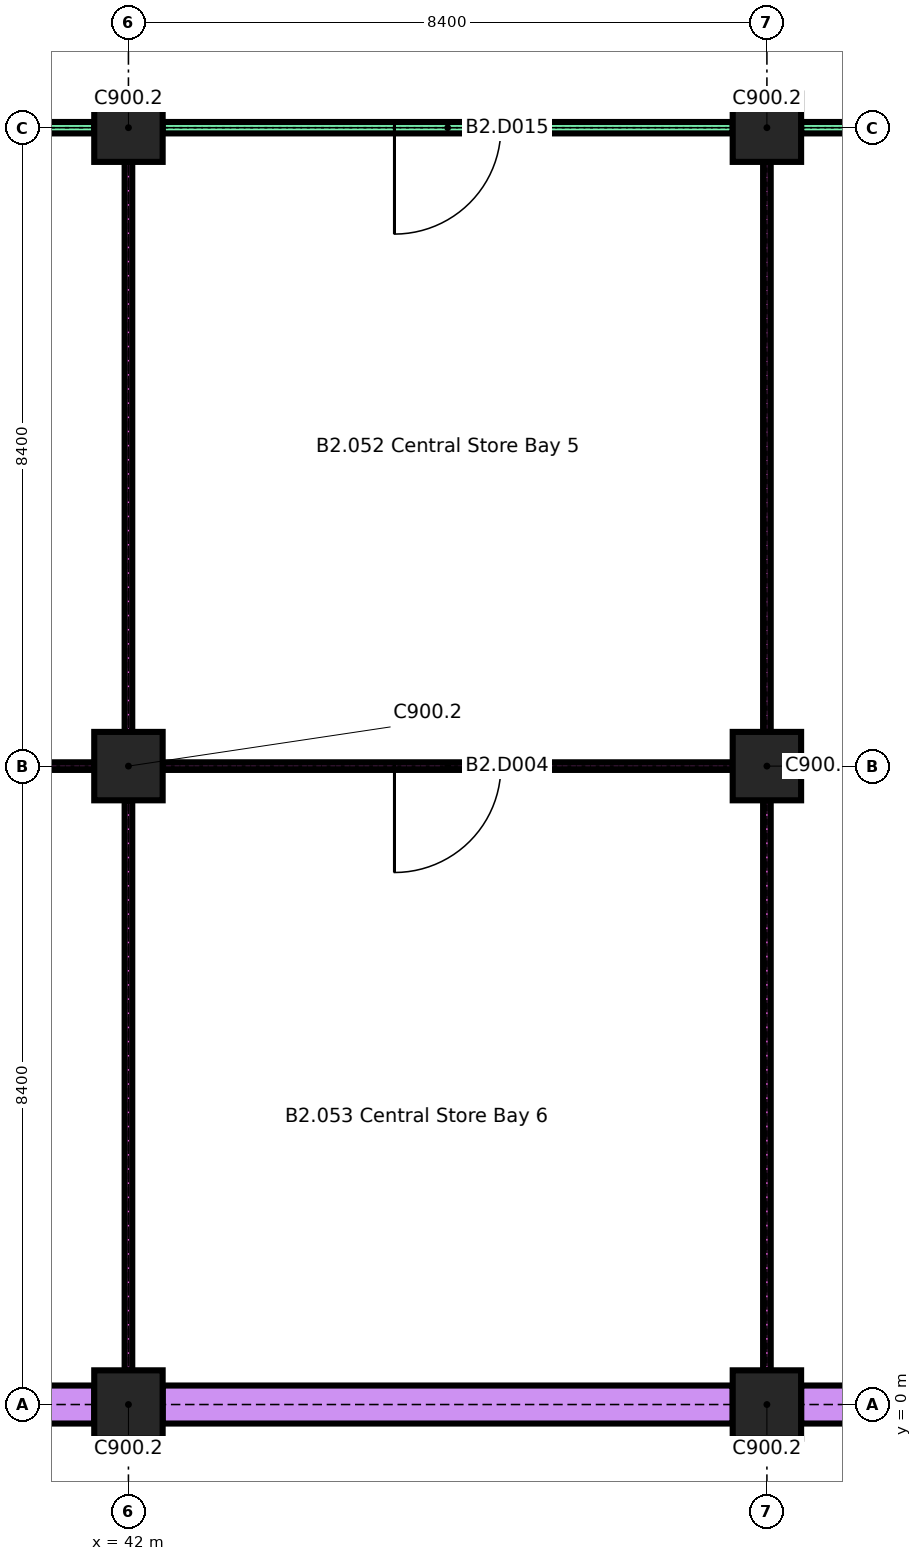
"""IFC4 building model, lengths in metres.
Left out: names, types, materials, properties, quantities, classifications, styles, units other than length and angle.
Written with IfcOpenShell. Run it as: python <this file> out.ifc"""

import sys

from ifc_helpers import new_model, si_unit, direction, frame, frame_2d, origin, origin_2d, place, context, subcontext, project, spatial, rectangle, extrude, element, fill, save


model = new_model("IFC4")
c1 = context("Model", 3, precision=1e-05, world=origin(), true_north=direction((0.0, 1.0)))
c2 = subcontext(c1, "Body", "Model", "MODEL_VIEW")
j1 = project(units=[si_unit("LENGTHUNIT", "METRE"), si_unit("PLANEANGLEUNIT", "RADIAN")], contexts=[c1])
p1 = place(None, origin())
s1 = spatial("IfcSite", under=j1, at=p1, CompositionType="ELEMENT")
p2 = place(p1, origin())
s2 = spatial("IfcBuilding", under=s1, at=p2, CompositionType="ELEMENT")
p3 = place(p2, frame((0.0, 0.0, -7.8)))
s3 = spatial("IfcBuildingStorey", under=s2, at=p3, CompositionType="ELEMENT", Elevation=-7.8)
for number, where, z_axis, x_axis in (
    (1, (42.0, 0.0, 0.0), (0.0, 0.0, 1.0), (1.0, 0.0, 0.0)),
    (2, (50.4, 0.0, 0.0), (0.0, 0.0, 1.0), (1.0, 0.0, 0.0)),
    (3, (42.0, 8.4, 0.0), (0.0, 0.0, 1.0), (1.0, 0.0, 0.0)),
    (4, (50.4, 8.4, 0.0), (0.0, 0.0, 1.0), (1.0, 0.0, 0.0)),
    (5, (42.0, 16.8, 0.0), (0.0, 0.0, 1.0), (1.0, 0.0, 0.0)),
    (6, (50.4, 16.8, 0.0), (0.0, 0.0, 1.0), (1.0, 0.0, 0.0)),
):
    element("IfcColumn", number, at=place(p3, frame(where, z_axis=z_axis, x_axis=x_axis)), inside=s3, PredefinedType="COLUMN", context=c2, shape_type="SweptSolid", body=[
        extrude(rectangle(XDim=0.9, YDim=0.9, at=origin_2d()), origin(), (0.0, 0.0, 1.0), 3.1),
    ])
for number, where, z_axis, x_axis in (
    (7, (34.05, 0.0, 0.0), (0.0, 0.0, 1.0), (1.0, 0.0, 0.0)),
    (8, (42.45, 0.0, 0.0), (0.0, 0.0, 1.0), (1.0, 0.0, 0.0)),
    (9, (50.85, 0.0, 0.0), (0.0, 0.0, 1.0), (1.0, 0.0, 0.0)),
):
    element("IfcWall", number, at=place(p3, frame(where, z_axis=z_axis, x_axis=x_axis)), inside=s3, PredefinedType="SOLIDWALL", context=c2, shape_type="SweptSolid", body=[
        extrude(rectangle(XDim=7.5, YDim=0.5, at=frame_2d((3.75, 0.0))), origin(), (0.0, 0.0, 1.0), 3.1),
    ])
p4 = place(p3, frame((34.05, 8.4, 0.0), z_axis=(0.0, 0.0, 1.0), x_axis=(1.0, 0.0, 0.0)))
e10 = element("IfcWall", 10, at=p4, inside=s3, PredefinedType="PARTITIONING", context=c2, shape_type="SweptSolid", body=[
    extrude(rectangle(XDim=7.5, YDim=0.1, at=frame_2d((3.75, 0.0))), origin(), (0.0, 0.0, 1.0), 3.1),
])
p5 = place(p4, frame((3.05, 0.0, 0.0)))
e11 = element("IfcOpeningElement", 11, at=p5, cuts=e10, PredefinedType="OPENING", context=c2, shape_type="SweptSolid", body=[
    extrude(rectangle(XDim=1.4, YDim=2.1, at=frame_2d((0.7, 1.05))), frame((0.0, 0.06, 0.0), z_axis=(0.0, -1.0, 0.0), x_axis=(1.0, 0.0, 0.0)), (0.0, 0.0, 1.0), 0.12),
])
p6 = place(p3, frame((42.45, 8.4, 0.0), z_axis=(0.0, 0.0, 1.0), x_axis=(1.0, 0.0, 0.0)))
e12 = element("IfcWall", 12, at=p6, inside=s3, PredefinedType="PARTITIONING", context=c2, shape_type="SweptSolid", body=[
    extrude(rectangle(XDim=7.5, YDim=0.1, at=frame_2d((3.75, 0.0))), origin(), (0.0, 0.0, 1.0), 3.1),
])
p7 = place(p6, frame((3.05, 0.0, 0.0)))
e13 = element("IfcOpeningElement", 13, at=p7, cuts=e12, PredefinedType="OPENING", context=c2, shape_type="SweptSolid", body=[
    extrude(rectangle(XDim=1.4, YDim=2.1, at=frame_2d((0.7, 1.05))), frame((0.0, 0.06, 0.0), z_axis=(0.0, -1.0, 0.0), x_axis=(1.0, 0.0, 0.0)), (0.0, 0.0, 1.0), 0.12),
])
p8 = place(p3, frame((34.05, 16.8, 0.0), z_axis=(0.0, 0.0, 1.0), x_axis=(1.0, 0.0, 0.0)))
e14 = element("IfcWall", 14, at=p8, inside=s3, PredefinedType="PARTITIONING", context=c2, shape_type="SweptSolid", body=[
    extrude(rectangle(XDim=7.5, YDim=0.15, at=frame_2d((3.75, 0.0))), origin(), (0.0, 0.0, 1.0), 3.1),
])
p9 = place(p8, frame((3.05, 0.0, 0.0)))
e15 = element("IfcOpeningElement", 15, at=p9, cuts=e14, PredefinedType="OPENING", context=c2, shape_type="SweptSolid", body=[
    extrude(rectangle(XDim=1.4, YDim=2.1, at=frame_2d((0.7, 1.05))), frame((0.0, 0.085, 0.0), z_axis=(0.0, -1.0, 0.0), x_axis=(1.0, 0.0, 0.0)), (0.0, 0.0, 1.0), 0.17),
])
p10 = place(p3, frame((42.45, 16.8, 0.0), z_axis=(0.0, 0.0, 1.0), x_axis=(1.0, 0.0, 0.0)))
e16 = element("IfcWall", 16, at=p10, inside=s3, PredefinedType="PARTITIONING", context=c2, shape_type="SweptSolid", body=[
    extrude(rectangle(XDim=7.5, YDim=0.15, at=frame_2d((3.75, 0.0))), origin(), (0.0, 0.0, 1.0), 3.1),
])
p11 = place(p10, frame((3.05, 0.0, 0.0)))
e17 = element("IfcOpeningElement", 17, at=p11, cuts=e16, PredefinedType="OPENING", context=c2, shape_type="SweptSolid", body=[
    extrude(rectangle(XDim=1.4, YDim=2.1, at=frame_2d((0.7, 1.05))), frame((0.0, 0.085, 0.0), z_axis=(0.0, -1.0, 0.0), x_axis=(1.0, 0.0, 0.0)), (0.0, 0.0, 1.0), 0.17),
])
p12 = place(p3, frame((50.85, 16.8, 0.0), z_axis=(0.0, 0.0, 1.0), x_axis=(1.0, 0.0, 0.0)))
e18 = element("IfcWall", 18, at=p12, inside=s3, PredefinedType="PARTITIONING", context=c2, shape_type="SweptSolid", body=[
    extrude(rectangle(XDim=7.5, YDim=0.15, at=frame_2d((3.75, 0.0))), origin(), (0.0, 0.0, 1.0), 3.1),
])
p13 = place(p12, frame((3.05, 0.0, 0.0)))
e19 = element("IfcOpeningElement", 19, at=p13, cuts=e18, PredefinedType="OPENING", context=c2, shape_type="SweptSolid", body=[
    extrude(rectangle(XDim=1.4, YDim=2.1, at=frame_2d((0.7, 1.05))), frame((0.0, 0.085, 0.0), z_axis=(0.0, -1.0, 0.0), x_axis=(1.0, 0.0, 0.0)), (0.0, 0.0, 1.0), 0.17),
])
for number, where, z_axis, x_axis in (
    (20, (42.0, 0.45, 0.0), (0.0, 0.0, 1.0), (0.0, 1.0, 0.0)),
    (21, (42.0, 8.85, 0.0), (0.0, 0.0, 1.0), (0.0, 1.0, 0.0)),
    (22, (50.4, 0.45, 0.0), (0.0, 0.0, 1.0), (0.0, 1.0, 0.0)),
    (23, (50.4, 8.85, 0.0), (0.0, 0.0, 1.0), (0.0, 1.0, 0.0)),
):
    element("IfcWall", number, at=place(p3, frame(where, z_axis=z_axis, x_axis=x_axis)), inside=s3, PredefinedType="PARTITIONING", context=c2, shape_type="SweptSolid", body=[
        extrude(rectangle(XDim=7.5, YDim=0.1, at=frame_2d((3.75, 0.0))), origin(), (0.0, 0.0, 1.0), 3.1),
    ])
p14 = place(p7, origin())
e24 = element("IfcDoor", 24, at=p14, inside=s3, OperationType="SINGLE_SWING_LEFT", PredefinedType="DOOR", context=c2, shape_type="SweptSolid", body=[
    extrude(rectangle(XDim=1.4, YDim=2.1, at=frame_2d((0.7, 1.05))), frame((0.0, 0.025, 0.0), z_axis=(0.0, -1.0, 0.0), x_axis=(1.0, 0.0, 0.0)), (0.0, 0.0, 1.0), 0.05),
])
fill(e13, e24)
p15 = place(p11, origin())
e25 = element("IfcDoor", 25, at=p15, inside=s3, OperationType="SINGLE_SWING_LEFT", PredefinedType="DOOR", context=c2, shape_type="SweptSolid", body=[
    extrude(rectangle(XDim=1.4, YDim=2.1, at=frame_2d((0.7, 1.05))), frame((0.0, 0.025, 0.0), z_axis=(0.0, -1.0, 0.0), x_axis=(1.0, 0.0, 0.0)), (0.0, 0.0, 1.0), 0.05),
])
fill(e17, e25)
save(model, sys.argv[1])
